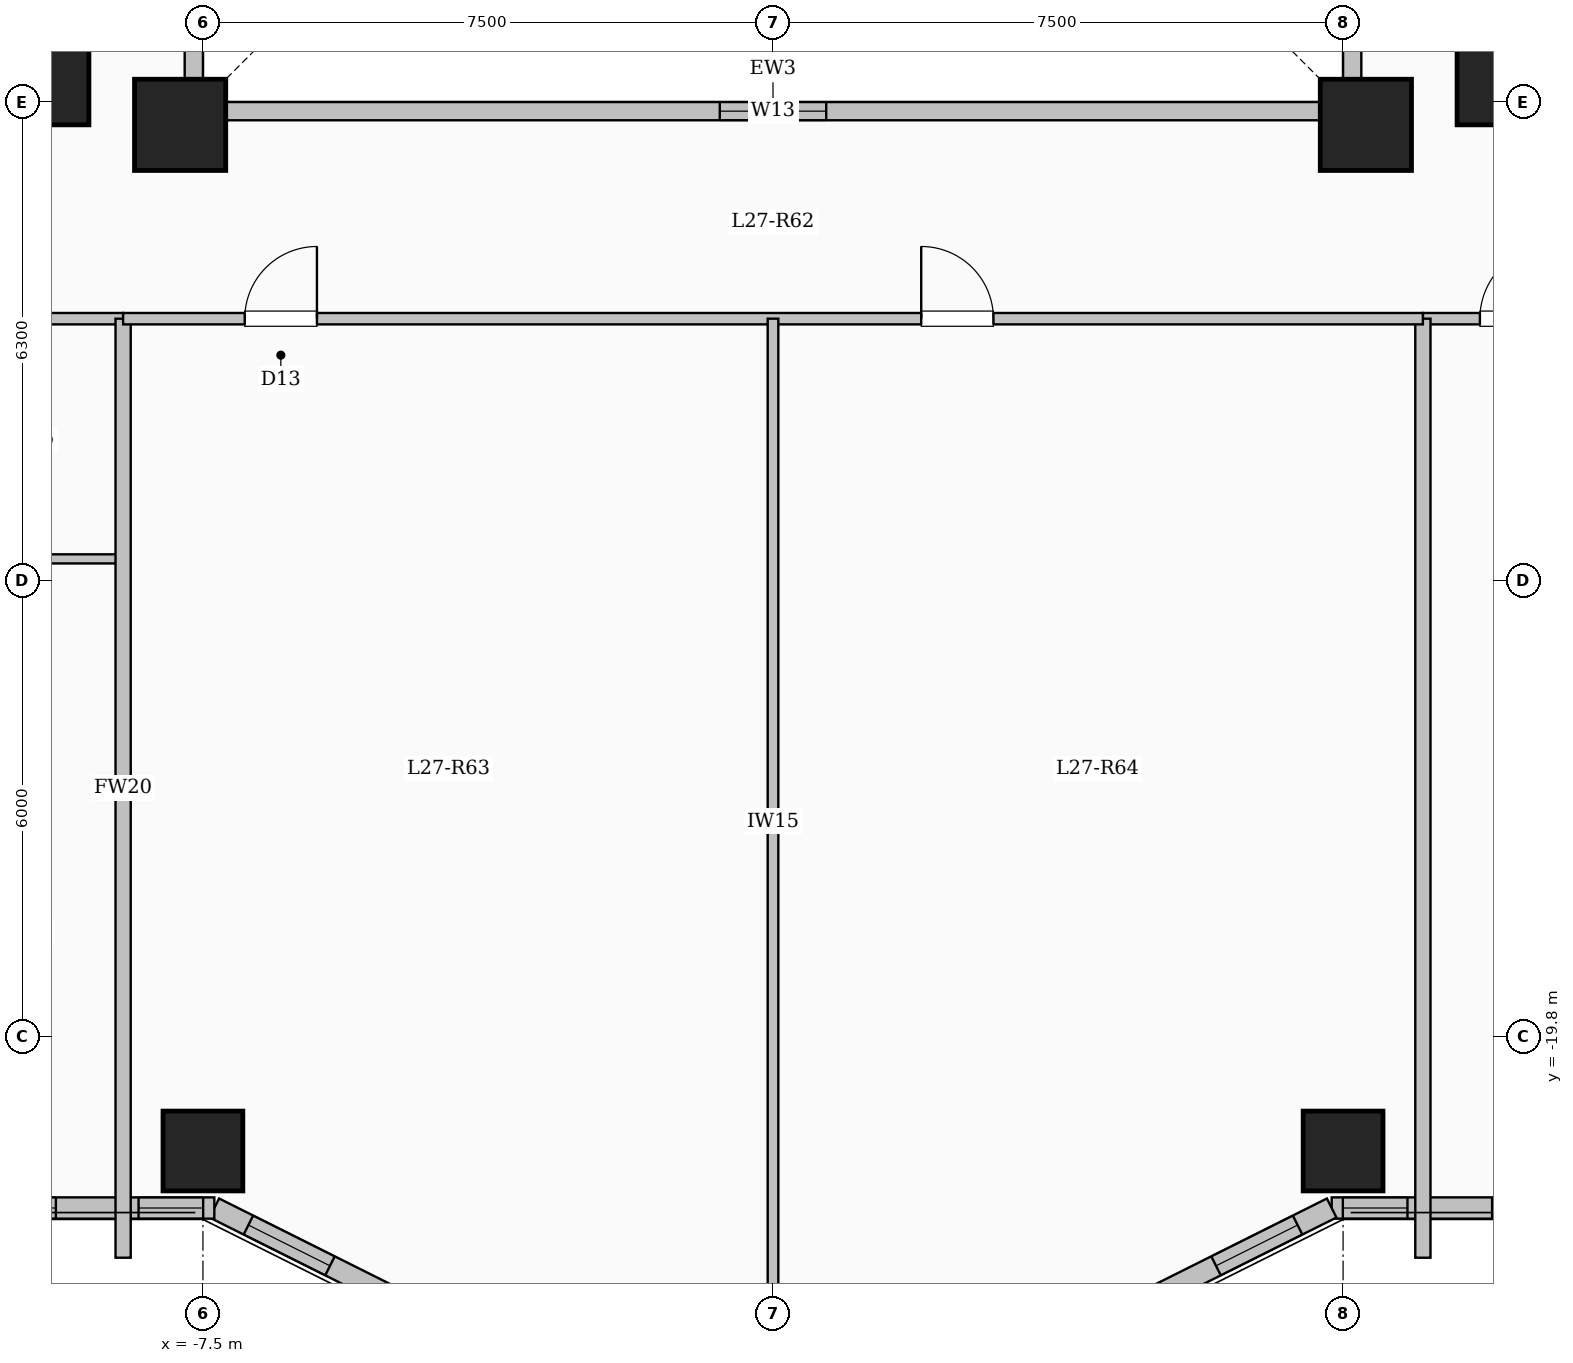
"""IFC4 building model, lengths in metres.
Left out: names, types, materials, properties, quantities, classifications, styles, units other than length and angle.
Written with IfcOpenShell. Run it as: python <this file> out.ifc"""

import sys

from ifc_helpers import new_model, si_unit, direction, frame, frame_2d, origin, origin_2d, place, context, subcontext, project, spatial, rectangle, extrude, element, fill, save


model = new_model("IFC4")
c1 = context("Model", 3, precision=1e-05, world=origin(), true_north=direction((0.0, 1.0)))
c2 = subcontext(c1, "Body", "Model", "MODEL_VIEW")
j1 = project(units=[si_unit("LENGTHUNIT", "METRE"), si_unit("PLANEANGLEUNIT", "RADIAN")], contexts=[c1])
p1 = place(None, origin())
s1 = spatial("IfcSite", under=j1, at=p1, CompositionType="ELEMENT")
p2 = place(p1, origin())
s2 = spatial("IfcBuilding", under=s1, at=p2, CompositionType="ELEMENT")
p3 = place(p2, frame((0.0, 0.0, 101.75)))
s3 = spatial("IfcBuildingStorey", under=s2, at=p3, CompositionType="ELEMENT", Elevation=101.75)
for number, where, z_axis, x_axis in (
    (1, (-7.8, -7.8, 0.0), (0.0, 0.0, 1.0), (1.0, 0.0, 0.0)),
    (2, (7.8, -7.8, 0.0), (0.0, 0.0, 1.0), (1.0, 0.0, 0.0)),
    (3, (-9.6, -7.2, 0.0), (0.0, 0.0, 1.0), (1.0, 0.0, 0.0)),
    (4, (9.6, -7.2, 0.0), (0.0, 0.0, 1.0), (1.0, 0.0, 0.0)),
):
    element("IfcColumn", number, at=place(p3, frame(where, z_axis=z_axis, x_axis=x_axis)), inside=s3, PredefinedType="COLUMN", context=c2, shape_type="SweptSolid", body=[
        extrude(rectangle(XDim=1.2, YDim=1.2, at=origin_2d()), origin(), (0.0, 0.0, 1.0), 3.35),
    ])
for number, where, z_axis, x_axis in (
    (5, (-7.5, -21.3, 0.0), (0.0, 0.0, 1.0), (1.0, 0.0, 0.0)),
    (6, (7.5, -21.3, 0.0), (0.0, 0.0, 1.0), (1.0, 0.0, 0.0)),
):
    element("IfcColumn", number, at=place(p3, frame(where, z_axis=z_axis, x_axis=x_axis)), inside=s3, PredefinedType="COLUMN", context=c2, shape_type="SweptSolid", body=[
        extrude(rectangle(XDim=1.05, YDim=1.05, at=origin_2d()), origin(), (0.0, 0.0, 1.0), 3.35),
    ])
p4 = place(p3, frame((-7.62, -7.62, 0.0), z_axis=(0.0, 0.0, 1.0), x_axis=(1.0, 0.0, 0.0)))
e7 = element("IfcWall", 7, at=p4, inside=s3, PredefinedType="SOLIDWALL", context=c2, shape_type="SweptSolid", body=[
    extrude(rectangle(XDim=15.24, YDim=0.24, at=frame_2d((7.62, 0.0))), origin(), (0.0, 0.0, 1.0), 3.1),
])
p5 = place(p4, frame((6.92, 0.0, 0.95)))
e8 = element("IfcOpeningElement", 8, at=p5, cuts=e7, PredefinedType="OPENING", context=c2, shape_type="SweptSolid", body=[
    extrude(rectangle(XDim=1.4, YDim=1.5, at=frame_2d((0.7, 0.75))), frame((0.0, 0.13, 0.0), z_axis=(0.0, -1.0, 0.0), x_axis=(1.0, 0.0, 0.0)), (0.0, 0.0, 1.0), 0.26),
])
p6 = place(p3, frame((7.62, -7.62, 0.0), z_axis=(0.0, 0.0, 1.0), x_axis=(0.0, 1.0, 0.0)))
e9 = element("IfcWall", 9, at=p6, inside=s3, PredefinedType="SOLIDWALL", context=c2, shape_type="SweptSolid", body=[
    extrude(rectangle(XDim=15.24, YDim=0.24, at=frame_2d((7.62, 0.0))), origin(), (0.0, 0.0, 1.0), 3.1),
])
p7 = place(p6, frame((6.92, 0.0, 0.95)))
e10 = element("IfcOpeningElement", 10, at=p7, cuts=e9, PredefinedType="OPENING", context=c2, shape_type="SweptSolid", body=[
    extrude(rectangle(XDim=1.4, YDim=1.5, at=frame_2d((0.7, 0.75))), frame((0.0, 0.13, 0.0), z_axis=(0.0, -1.0, 0.0), x_axis=(1.0, 0.0, 0.0)), (0.0, 0.0, 1.0), 0.26),
])
p8 = place(p3, frame((-7.62, 7.62, 0.0), z_axis=(0.0, 0.0, 1.0), x_axis=(0.0, -1.0, 0.0)))
e11 = element("IfcWall", 11, at=p8, inside=s3, PredefinedType="SOLIDWALL", context=c2, shape_type="SweptSolid", body=[
    extrude(rectangle(XDim=15.24, YDim=0.24, at=frame_2d((7.62, 0.0))), origin(), (0.0, 0.0, 1.0), 3.1),
])
p9 = place(p8, frame((6.92, 0.0, 0.95)))
e12 = element("IfcOpeningElement", 12, at=p9, cuts=e11, PredefinedType="OPENING", context=c2, shape_type="SweptSolid", body=[
    extrude(rectangle(XDim=1.4, YDim=1.5, at=frame_2d((0.7, 0.75))), frame((0.0, 0.13, 0.0), z_axis=(0.0, -1.0, 0.0), x_axis=(1.0, 0.0, 0.0)), (0.0, 0.0, 1.0), 0.26),
])
p10 = place(p3, frame((21.15, -22.05, 0.0), z_axis=(0.0, 0.0, 1.0), x_axis=(-1.0, 0.0, 0.0)))
e13 = element("IfcWall", 13, at=p10, inside=s3, PredefinedType="SOLIDWALL", context=c2, shape_type="SweptSolid", body=[
    extrude(rectangle(XDim=13.8, YDim=0.28, at=frame_2d((6.9, 0.0))), origin(), (0.0, 0.0, 1.0), 3.1),
])
p11 = place(p10, frame((0.831, 0.0, 0.9)))
e14 = element("IfcOpeningElement", 14, at=p11, cuts=e13, PredefinedType="OPENING", context=c2, shape_type="SweptSolid", body=[
    extrude(rectangle(XDim=1.5, YDim=1.65, at=frame_2d((0.75, 0.825))), frame((0.0, 0.15, 0.0), z_axis=(0.0, -1.0, 0.0), x_axis=(1.0, 0.0, 0.0)), (0.0, 0.0, 1.0), 0.3),
])
p12 = place(p10, frame((3.967, 0.0, 0.9)))
e15 = element("IfcOpeningElement", 15, at=p12, cuts=e13, PredefinedType="OPENING", context=c2, shape_type="SweptSolid", body=[
    extrude(rectangle(XDim=1.5, YDim=1.65, at=frame_2d((0.75, 0.825))), frame((0.0, 0.15, 0.0), z_axis=(0.0, -1.0, 0.0), x_axis=(1.0, 0.0, 0.0)), (0.0, 0.0, 1.0), 0.3),
])
p13 = place(p10, frame((7.078, 0.0, 0.9)))
e16 = element("IfcOpeningElement", 16, at=p13, cuts=e13, PredefinedType="OPENING", context=c2, shape_type="SweptSolid", body=[
    extrude(rectangle(XDim=1.5, YDim=1.65, at=frame_2d((0.75, 0.825))), frame((0.0, 0.15, 0.0), z_axis=(0.0, -1.0, 0.0), x_axis=(1.0, 0.0, 0.0)), (0.0, 0.0, 1.0), 0.3),
])
p14 = place(p10, frame((10.19, 0.0, 0.9)))
e17 = element("IfcOpeningElement", 17, at=p14, cuts=e13, PredefinedType="OPENING", context=c2, shape_type="SweptSolid", body=[
    extrude(rectangle(XDim=1.5, YDim=1.65, at=frame_2d((0.75, 0.825))), frame((0.0, 0.15, 0.0), z_axis=(0.0, -1.0, 0.0), x_axis=(1.0, 0.0, 0.0)), (0.0, 0.0, 1.0), 0.3),
])
p15 = place(p10, frame((12.803, 0.0, 0.95)))
e18 = element("IfcOpeningElement", 18, at=p15, cuts=e13, PredefinedType="OPENING", context=c2, shape_type="SweptSolid", body=[
    extrude(rectangle(XDim=0.85, YDim=1.5, at=frame_2d((0.425, 0.75))), frame((0.0, 0.15, 0.0), z_axis=(0.0, -1.0, 0.0), x_axis=(1.0, 0.0, 0.0)), (0.0, 0.0, 1.0), 0.3),
])
p16 = place(p3, frame((7.35, -22.05, 0.0), z_axis=(0.0, 0.0, 1.0), x_axis=(-0.894427191, -0.4472135955, 0.0)))
e19 = element("IfcWall", 19, at=p16, inside=s3, PredefinedType="SOLIDWALL", context=c2, shape_type="SweptSolid", body=[
    extrude(rectangle(XDim=3.354, YDim=0.28, at=frame_2d((1.677, 0.0))), origin(), (0.0, 0.0, 1.0), 3.1),
])
p17 = place(p16, frame((0.501, 0.0, 0.95)))
e20 = element("IfcOpeningElement", 20, at=p17, cuts=e19, PredefinedType="OPENING", context=c2, shape_type="SweptSolid", body=[
    extrude(rectangle(XDim=1.2, YDim=1.5, at=frame_2d((0.6, 0.75))), frame((0.0, 0.15, 0.0), z_axis=(0.0, -1.0, 0.0), x_axis=(1.0, 0.0, 0.0)), (0.0, 0.0, 1.0), 0.3),
])
p18 = place(p3, frame((-4.35, -23.55, 0.0), z_axis=(0.0, 0.0, 1.0), x_axis=(-0.894427191, 0.4472135955, 0.0)))
e21 = element("IfcWall", 21, at=p18, inside=s3, PredefinedType="SOLIDWALL", context=c2, shape_type="SweptSolid", body=[
    extrude(rectangle(XDim=3.354, YDim=0.28, at=frame_2d((1.677, 0.0))), origin(), (0.0, 0.0, 1.0), 3.1),
])
p19 = place(p18, frame((1.653, 0.0, 0.95)))
e22 = element("IfcOpeningElement", 22, at=p19, cuts=e21, PredefinedType="OPENING", context=c2, shape_type="SweptSolid", body=[
    extrude(rectangle(XDim=1.2, YDim=1.5, at=frame_2d((0.6, 0.75))), frame((0.0, 0.15, 0.0), z_axis=(0.0, -1.0, 0.0), x_axis=(1.0, 0.0, 0.0)), (0.0, 0.0, 1.0), 0.3),
])
p20 = place(p3, frame((-7.35, -22.05, 0.0), z_axis=(0.0, 0.0, 1.0), x_axis=(-1.0, 0.0, 0.0)))
e23 = element("IfcWall", 23, at=p20, inside=s3, PredefinedType="SOLIDWALL", context=c2, shape_type="SweptSolid", body=[
    extrude(rectangle(XDim=13.8, YDim=0.28, at=frame_2d((6.9, 0.0))), origin(), (0.0, 0.0, 1.0), 3.1),
])
p21 = place(p20, frame((0.147, 0.0, 0.95)))
e24 = element("IfcOpeningElement", 24, at=p21, cuts=e23, PredefinedType="OPENING", context=c2, shape_type="SweptSolid", body=[
    extrude(rectangle(XDim=0.85, YDim=1.5, at=frame_2d((0.425, 0.75))), frame((0.0, 0.15, 0.0), z_axis=(0.0, -1.0, 0.0), x_axis=(1.0, 0.0, 0.0)), (0.0, 0.0, 1.0), 0.3),
])
p22 = place(p20, frame((2.085, 0.0, 0.95)))
e25 = element("IfcOpeningElement", 25, at=p22, cuts=e23, PredefinedType="OPENING", context=c2, shape_type="SweptSolid", body=[
    extrude(rectangle(XDim=1.2, YDim=1.5, at=frame_2d((0.6, 0.75))), frame((0.0, 0.15, 0.0), z_axis=(0.0, -1.0, 0.0), x_axis=(1.0, 0.0, 0.0)), (0.0, 0.0, 1.0), 0.3),
])
p23 = place(p20, frame((4.946, 0.0, 0.9)))
e26 = element("IfcOpeningElement", 26, at=p23, cuts=e23, PredefinedType="OPENING", context=c2, shape_type="SweptSolid", body=[
    extrude(rectangle(XDim=1.5, YDim=1.65, at=frame_2d((0.75, 0.825))), frame((0.0, 0.15, 0.0), z_axis=(0.0, -1.0, 0.0), x_axis=(1.0, 0.0, 0.0)), (0.0, 0.0, 1.0), 0.3),
])
p24 = place(p20, frame((8.007, 0.0, 0.9)))
e27 = element("IfcOpeningElement", 27, at=p24, cuts=e23, PredefinedType="OPENING", context=c2, shape_type="SweptSolid", body=[
    extrude(rectangle(XDim=1.5, YDim=1.65, at=frame_2d((0.75, 0.825))), frame((0.0, 0.15, 0.0), z_axis=(0.0, -1.0, 0.0), x_axis=(1.0, 0.0, 0.0)), (0.0, 0.0, 1.0), 0.3),
])
p25 = place(p20, frame((11.118, 0.0, 0.9)))
e28 = element("IfcOpeningElement", 28, at=p25, cuts=e23, PredefinedType="OPENING", context=c2, shape_type="SweptSolid", body=[
    extrude(rectangle(XDim=1.8, YDim=1.65, at=frame_2d((0.9, 0.825))), frame((0.0, 0.15, 0.0), z_axis=(0.0, -1.0, 0.0), x_axis=(1.0, 0.0, 0.0)), (0.0, 0.0, 1.0), 0.3),
])
p26 = place(p3, frame((-21.05, -10.35, 0.0), z_axis=(0.0, 0.0, 1.0), x_axis=(1.0, 0.0, 0.0)))
e29 = element("IfcWall", 29, at=p26, inside=s3, PredefinedType="PARTITIONING", context=c2, shape_type="SweptSolid", body=[
    extrude(rectangle(XDim=12.5, YDim=0.15, at=frame_2d((6.25, 0.0))), origin(), (0.0, 0.0, 1.0), 3.1),
])
p27 = place(p26, frame((0.7, 0.0, 0.0)))
e30 = element("IfcOpeningElement", 30, at=p27, cuts=e29, PredefinedType="OPENING", context=c2, shape_type="SweptSolid", body=[
    extrude(rectangle(XDim=0.96, YDim=2.15, at=frame_2d((0.48, 1.075))), frame((0.0, 0.085, 0.0), z_axis=(0.0, -1.0, 0.0), x_axis=(1.0, 0.0, 0.0)), (0.0, 0.0, 1.0), 0.17),
])
p28 = place(p26, frame((7.174, 0.0, 0.0)))
e31 = element("IfcOpeningElement", 31, at=p28, cuts=e29, PredefinedType="OPENING", context=c2, shape_type="SweptSolid", body=[
    extrude(rectangle(XDim=0.96, YDim=2.15, at=frame_2d((0.48, 1.075))), frame((0.0, 0.085, 0.0), z_axis=(0.0, -1.0, 0.0), x_axis=(1.0, 0.0, 0.0)), (0.0, 0.0, 1.0), 0.17),
])
p29 = place(p3, frame((8.55, -10.35, 0.0), z_axis=(0.0, 0.0, 1.0), x_axis=(1.0, 0.0, 0.0)))
e32 = element("IfcWall", 32, at=p29, inside=s3, PredefinedType="PARTITIONING", context=c2, shape_type="SweptSolid", body=[
    extrude(rectangle(XDim=12.5, YDim=0.15, at=frame_2d((6.25, 0.0))), origin(), (0.0, 0.0, 1.0), 3.1),
])
p30 = place(p29, frame((0.75, 0.0, 0.0)))
e33 = element("IfcOpeningElement", 33, at=p30, cuts=e32, PredefinedType="OPENING", context=c2, shape_type="SweptSolid", body=[
    extrude(rectangle(XDim=0.96, YDim=2.15, at=frame_2d((0.48, 1.075))), frame((0.0, 0.085, 0.0), z_axis=(0.0, -1.0, 0.0), x_axis=(1.0, 0.0, 0.0)), (0.0, 0.0, 1.0), 0.17),
])
p31 = place(p29, frame((6.975, 0.0, 0.0)))
e34 = element("IfcOpeningElement", 34, at=p31, cuts=e32, PredefinedType="OPENING", context=c2, shape_type="SweptSolid", body=[
    extrude(rectangle(XDim=0.96, YDim=2.15, at=frame_2d((0.48, 1.075))), frame((0.0, 0.085, 0.0), z_axis=(0.0, -1.0, 0.0), x_axis=(1.0, 0.0, 0.0)), (0.0, 0.0, 1.0), 0.17),
])
p32 = place(p3, frame((-11.531, -13.51, 0.0), z_axis=(0.0, 0.0, 1.0), x_axis=(1.0, 0.0, 0.0)))
e35 = element("IfcWall", 35, at=p32, inside=s3, PredefinedType="PARTITIONING", context=c2, shape_type="SweptSolid", body=[
    extrude(rectangle(XDim=2.991, YDim=0.12, at=frame_2d((1.496, 0.0))), origin(), (0.0, 0.0, 1.0), 3.1),
])
for number, where, z_axis, x_axis in (
    (36, (-8.55, -22.704, 0.0), (0.0, 0.0, 1.0), (0.0, 1.0, 0.0)),
    (37, (8.55, -22.704, 0.0), (0.0, 0.0, 1.0), (0.0, 1.0, 0.0)),
):
    element("IfcWall", number, at=place(p3, frame(where, z_axis=z_axis, x_axis=x_axis)), inside=s3, PredefinedType="SOLIDWALL", context=c2, shape_type="SweptSolid", body=[
        extrude(rectangle(XDim=12.354, YDim=0.2, at=frame_2d((6.177, 0.0))), origin(), (0.0, 0.0, 1.0), 3.1),
    ])
p33 = place(p3, frame((-8.55, -10.35, 0.0), z_axis=(0.0, 0.0, 1.0), x_axis=(1.0, 0.0, 0.0)))
e38 = element("IfcWall", 38, at=p33, inside=s3, PredefinedType="PARTITIONING", context=c2, shape_type="SweptSolid", body=[
    extrude(rectangle(XDim=17.1, YDim=0.15, at=frame_2d((8.55, 0.0))), origin(), (0.0, 0.0, 1.0), 3.1),
])
p34 = place(p33, frame((1.6, 0.0, 0.0)))
e39 = element("IfcOpeningElement", 39, at=p34, cuts=e38, PredefinedType="OPENING", context=c2, shape_type="SweptSolid", body=[
    extrude(rectangle(XDim=0.95, YDim=2.15, at=frame_2d((0.475, 1.075))), frame((0.0, 0.085, 0.0), z_axis=(0.0, -1.0, 0.0), x_axis=(1.0, 0.0, 0.0)), (0.0, 0.0, 1.0), 0.17),
])
p35 = place(p33, frame((10.5, 0.0, 0.0)))
e40 = element("IfcOpeningElement", 40, at=p35, cuts=e38, PredefinedType="OPENING", context=c2, shape_type="SweptSolid", body=[
    extrude(rectangle(XDim=0.95, YDim=2.15, at=frame_2d((0.475, 1.075))), frame((0.0, 0.085, 0.0), z_axis=(0.0, -1.0, 0.0), x_axis=(1.0, 0.0, 0.0)), (0.0, 0.0, 1.0), 0.17),
])
p36 = place(p3, frame((0.0, -23.58, 0.0), z_axis=(0.0, 0.0, 1.0), x_axis=(0.0, 1.0, 0.0)))
e41 = element("IfcWall", 41, at=p36, inside=s3, PredefinedType="PARTITIONING", context=c2, shape_type="SweptSolid", body=[
    extrude(rectangle(XDim=13.23, YDim=0.14, at=frame_2d((6.615, 0.0))), origin(), (0.0, 0.0, 1.0), 3.1),
])
p37 = place(p5, origin())
e42 = element("IfcWindow", 42, at=p37, inside=s3, PartitioningType="SINGLE_PANEL", PredefinedType="WINDOW", context=c2, shape_type="SweptSolid", body=[
    extrude(rectangle(XDim=1.4, YDim=1.5, at=frame_2d((0.7, 0.75))), frame((0.0, 0.03, 0.0), z_axis=(0.0, -1.0, 0.0), x_axis=(1.0, 0.0, 0.0)), (0.0, 0.0, 1.0), 0.06),
])
fill(e8, e42)
p38 = place(p14, origin())
e43 = element("IfcWindow", 43, at=p38, inside=s3, PartitioningType="SINGLE_PANEL", PredefinedType="WINDOW", context=c2, shape_type="SweptSolid", body=[
    extrude(rectangle(XDim=1.5, YDim=1.65, at=frame_2d((0.75, 0.825))), frame((0.0, 0.03, 0.0), z_axis=(0.0, -1.0, 0.0), x_axis=(1.0, 0.0, 0.0)), (0.0, 0.0, 1.0), 0.06),
])
fill(e17, e43)
p39 = place(p15, origin())
e44 = element("IfcWindow", 44, at=p39, inside=s3, PartitioningType="SINGLE_PANEL", PredefinedType="WINDOW", context=c2, shape_type="SweptSolid", body=[
    extrude(rectangle(XDim=0.85, YDim=1.5, at=frame_2d((0.425, 0.75))), frame((0.0, 0.03, 0.0), z_axis=(0.0, -1.0, 0.0), x_axis=(1.0, 0.0, 0.0)), (0.0, 0.0, 1.0), 0.06),
])
fill(e18, e44)
p40 = place(p17, origin())
e45 = element("IfcWindow", 45, at=p40, inside=s3, PartitioningType="SINGLE_PANEL", PredefinedType="WINDOW", context=c2, shape_type="SweptSolid", body=[
    extrude(rectangle(XDim=1.2, YDim=1.5, at=frame_2d((0.6, 0.75))), frame((0.0, 0.03, 0.0), z_axis=(0.0, -1.0, 0.0), x_axis=(1.0, 0.0, 0.0)), (0.0, 0.0, 1.0), 0.06),
])
fill(e20, e45)
p41 = place(p19, origin())
e46 = element("IfcWindow", 46, at=p41, inside=s3, PartitioningType="SINGLE_PANEL", PredefinedType="WINDOW", context=c2, shape_type="SweptSolid", body=[
    extrude(rectangle(XDim=1.2, YDim=1.5, at=frame_2d((0.6, 0.75))), frame((0.0, 0.03, 0.0), z_axis=(0.0, -1.0, 0.0), x_axis=(1.0, 0.0, 0.0)), (0.0, 0.0, 1.0), 0.06),
])
fill(e22, e46)
p42 = place(p21, origin())
e47 = element("IfcWindow", 47, at=p42, inside=s3, PartitioningType="SINGLE_PANEL", PredefinedType="WINDOW", context=c2, shape_type="SweptSolid", body=[
    extrude(rectangle(XDim=0.85, YDim=1.5, at=frame_2d((0.425, 0.75))), frame((0.0, 0.03, 0.0), z_axis=(0.0, -1.0, 0.0), x_axis=(1.0, 0.0, 0.0)), (0.0, 0.0, 1.0), 0.06),
])
fill(e24, e47)
p43 = place(p22, origin())
e48 = element("IfcWindow", 48, at=p43, inside=s3, PartitioningType="SINGLE_PANEL", PredefinedType="WINDOW", context=c2, shape_type="SweptSolid", body=[
    extrude(rectangle(XDim=1.2, YDim=1.5, at=frame_2d((0.6, 0.75))), frame((0.0, 0.03, 0.0), z_axis=(0.0, -1.0, 0.0), x_axis=(1.0, 0.0, 0.0)), (0.0, 0.0, 1.0), 0.06),
])
fill(e25, e48)
p44 = place(p30, origin())
e49 = element("IfcDoor", 49, at=p44, inside=s3, OperationType="SINGLE_SWING_RIGHT", PredefinedType="DOOR", context=c2, shape_type="SweptSolid", body=[
    extrude(rectangle(XDim=0.96, YDim=2.15, at=frame_2d((0.48, 1.075))), frame((0.0, 0.025, 0.0), z_axis=(0.0, -1.0, 0.0), x_axis=(1.0, 0.0, 0.0)), (0.0, 0.0, 1.0), 0.05),
])
fill(e33, e49)
p45 = place(p34, origin())
e50 = element("IfcDoor", 50, at=p45, inside=s3, OperationType="SINGLE_SWING_RIGHT", PredefinedType="DOOR", context=c2, shape_type="SweptSolid", body=[
    extrude(rectangle(XDim=0.95, YDim=2.15, at=frame_2d((0.475, 1.075))), frame((0.0, 0.025, 0.0), z_axis=(0.0, -1.0, 0.0), x_axis=(1.0, 0.0, 0.0)), (0.0, 0.0, 1.0), 0.05),
])
fill(e39, e50)
p46 = place(p35, origin())
e51 = element("IfcDoor", 51, at=p46, inside=s3, OperationType="SINGLE_SWING_LEFT", PredefinedType="DOOR", context=c2, shape_type="SweptSolid", body=[
    extrude(rectangle(XDim=0.95, YDim=2.15, at=frame_2d((0.475, 1.075))), frame((0.0, 0.025, 0.0), z_axis=(0.0, -1.0, 0.0), x_axis=(1.0, 0.0, 0.0)), (0.0, 0.0, 1.0), 0.05),
])
fill(e40, e51)
save(model, sys.argv[1])
